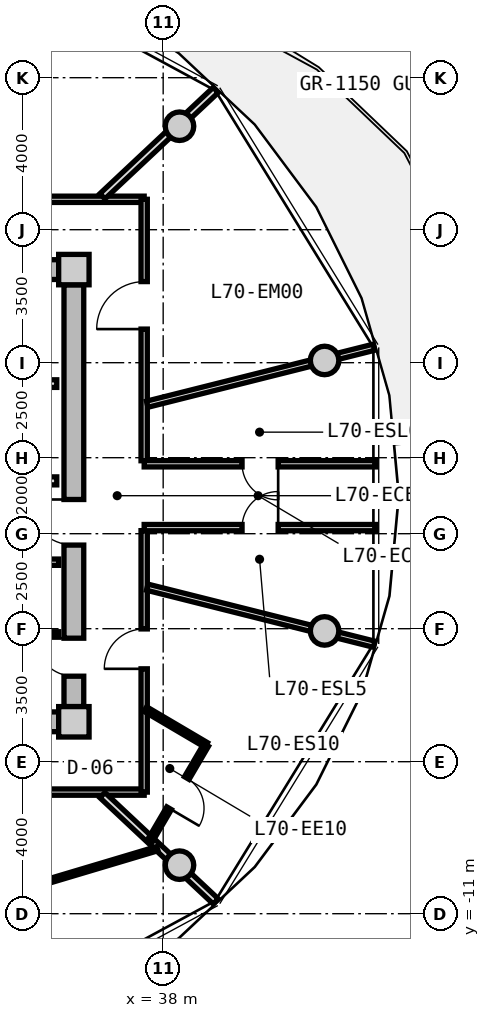
"""IFC4 building model, lengths in metres.
Left out: names, types, materials, properties, quantities, classifications, styles, units other than length and angle.
Written with IfcOpenShell. Run it as: python <this file> out.ifc"""

import sys

from ifc_helpers import new_model, si_unit, direction, frame, frame_2d, origin, origin_2d, place, context, subcontext, project, spatial, rectangle, circle, extrude, source, transform, mapped, element, fill, save


model = new_model("IFC4")
c1 = context("Model", 3, precision=1e-05, world=origin(), true_north=direction((0.0, 1.0)))
c2 = subcontext(c1, "Body", "Model", "MODEL_VIEW")
j1 = project(units=[si_unit("LENGTHUNIT", "METRE"), si_unit("PLANEANGLEUNIT", "RADIAN")], contexts=[c1])
p1 = place(None, origin())
s1 = spatial("IfcSite", under=j1, at=p1, CompositionType="ELEMENT")
p2 = place(p1, origin())
s2 = spatial("IfcBuilding", under=s1, at=p2, CompositionType="ELEMENT")
p3 = place(p2, frame((0.0, 0.0, 226.1)))
s3 = spatial("IfcBuildingStorey", under=s2, at=p3, CompositionType="ELEMENT", Elevation=226.1)
m1 = source(origin(), c2, "Body", "SweptSolid", [
    extrude(rectangle(XDim=0.8, YDim=0.8, at=origin_2d()), origin(), (0.0, 0.0, 1.0), 3.05),
])
for number, where, z_axis, x_axis in (
    (1, (35.65, -5.95, 0.0), (0.0, 0.0, 1.0), (1.0, 0.0, 0.0)),
    (2, (35.65, 5.95, 0.0), (0.0, 0.0, 1.0), (1.0, 0.0, 0.0)),
):
    element("IfcColumn", number, at=place(p3, frame(where, z_axis=z_axis, x_axis=x_axis)), inside=s3, PredefinedType="COLUMN", context=c2, shape_type="MappedRepresentation", body=[
        mapped(m1, transform((0.0, 0.0, 0.0), x_axis=(1.0, 0.0, 0.0), y_axis=(0.0, 1.0, 0.0), z_axis=(0.0, 0.0, 1.0), scale=1.0)),
    ])
m2 = source(origin(), c2, "Body", "SweptSolid", [
    extrude(rectangle(XDim=14.5, YDim=0.52, at=frame_2d((7.25, 0.0))), origin(), (0.0, 0.0, 1.0), 2.76),
])
for number, where, z_axis, x_axis in (
    (3, (20.75, 5.95, 0.0), (0.0, 0.0, 1.0), (1.0, 0.0, 0.0)),
    (4, (35.25, -5.95, 0.0), (0.0, 0.0, 1.0), (-1.0, 0.0, 0.0)),
):
    element("IfcWall", number, at=place(p3, frame(where, z_axis=z_axis, x_axis=x_axis)), inside=s3, PredefinedType="SHEAR", context=c2, shape_type="MappedRepresentation", body=[
        mapped(m2, transform((0.0, 0.0, 0.0), x_axis=(1.0, 0.0, 0.0), y_axis=(0.0, 1.0, 0.0), z_axis=(0.0, 0.0, 1.0), scale=1.0)),
    ])
m3 = source(origin(), c2, "Body", "SweptSolid", [
    extrude(rectangle(XDim=11.1, YDim=0.52, at=frame_2d((5.55, 0.0))), origin(), (0.0, 0.0, 1.0), 2.76),
])
p4 = place(p3, frame((35.65, 5.55, 0.0), z_axis=(0.0, 0.0, 1.0), x_axis=(0.0, -1.0, 0.0)))
e5 = element("IfcWall", 5, at=p4, inside=s3, PredefinedType="SHEAR", context=c2, shape_type="MappedRepresentation", body=[
    mapped(m3, transform((0.0, 0.0, 0.0), x_axis=(1.0, 0.0, 0.0), y_axis=(0.0, 1.0, 0.0), z_axis=(0.0, 0.0, 1.0), scale=1.0)),
])
p5 = place(p4, frame((5.65, 0.0, 0.0)))
e6 = element("IfcOpeningElement", 6, at=p5, cuts=e5, PredefinedType="OPENING", context=c2, shape_type="SweptSolid", body=[
    extrude(rectangle(XDim=1.2, YDim=2.15, at=frame_2d((0.6, 1.075))), frame((0.0, 0.27, 0.0), z_axis=(0.0, -1.0, 0.0), x_axis=(1.0, 0.0, 0.0)), (0.0, 0.0, 1.0), 0.54),
])
p6 = place(p4, frame((9.3, 0.0, 0.0)))
e7 = element("IfcOpeningElement", 7, at=p6, cuts=e5, PredefinedType="OPENING", context=c2, shape_type="SweptSolid", body=[
    extrude(rectangle(XDim=1.0, YDim=2.1, at=frame_2d((0.5, 1.05))), frame((0.0, 0.27, 0.0), z_axis=(0.0, -1.0, 0.0), x_axis=(1.0, 0.0, 0.0)), (0.0, 0.0, 1.0), 0.54),
])
m4 = source(origin(), c2, "Body", "SweptSolid", [
    extrude(circle(Radius=0.375, at=origin_2d()), origin(), (0.0, 0.0, 1.0), 3.05),
])
for number, where, z_axis, x_axis in (
    (8, (42.247, 3.559, 0.0), (0.0, 0.0, 1.0), (1.0, 0.0, 0.0)),
    (9, (38.43, 9.723, 0.0), (0.0, 0.0, 1.0), (1.0, 0.0, 0.0)),
    (10, (38.43, -9.723, 0.0), (0.0, 0.0, 1.0), (1.0, 0.0, 0.0)),
    (11, (42.247, -3.559, 0.0), (0.0, 0.0, 1.0), (1.0, 0.0, 0.0)),
):
    element("IfcColumn", number, at=place(p3, frame(where, z_axis=z_axis, x_axis=x_axis)), inside=s3, PredefinedType="COLUMN", context=c2, shape_type="MappedRepresentation", body=[
        mapped(m4, transform((0.0, 0.0, 0.0), x_axis=(1.0, 0.0, 0.0), y_axis=(0.0, 1.0, 0.0), z_axis=(0.0, 0.0, 1.0), scale=1.0)),
    ])
m5 = source(origin(), c2, "Body", "SweptSolid", [
    extrude(rectangle(XDim=3.2, YDim=0.2, at=frame_2d((1.6, 0.0))), origin(), (0.0, 0.0, 1.0), 2.745),
])
p7 = place(p3, frame((32.0, 2.95, 0.0), z_axis=(0.0, 0.0, 1.0), x_axis=(1.0, 0.0, 0.0)))
e12 = element("IfcWall", 12, at=p7, inside=s3, PredefinedType="PARTITIONING", context=c2, shape_type="MappedRepresentation", body=[
    mapped(m5, transform((0.0, 0.0, 0.0), x_axis=(1.0, 0.0, 0.0), y_axis=(0.0, 1.0, 0.0), z_axis=(0.0, 0.0, 1.0), scale=1.0)),
])
m6 = source(origin(), c2, "Body", "SweptSolid", [
    extrude(rectangle(XDim=6.66, YDim=0.21, at=frame_2d((3.33, 0.0))), origin(), (0.0, 0.0, 1.0), 2.745),
])
p8 = place(p3, frame((28.54, 0.39, 0.0), z_axis=(0.0, 0.0, 1.0), x_axis=(1.0, 0.0, 0.0)))
e13 = element("IfcWall", 13, at=p8, inside=s3, PredefinedType="PARTITIONING", context=c2, shape_type="MappedRepresentation", body=[
    mapped(m6, transform((0.0, 0.0, 0.0), x_axis=(1.0, 0.0, 0.0), y_axis=(0.0, 1.0, 0.0), z_axis=(0.0, 0.0, 1.0), scale=1.0)),
])
p9 = place(p8, frame((1.0, 0.0, 0.0)))
e14 = element("IfcOpeningElement", 14, at=p9, cuts=e13, PredefinedType="OPENING", context=c2, shape_type="SweptSolid", body=[
    extrude(rectangle(XDim=1.2, YDim=2.15, at=frame_2d((0.6, 1.075))), frame((0.0, 0.115, 0.0), z_axis=(0.0, -1.0, 0.0), x_axis=(1.0, 0.0, 0.0)), (0.0, 0.0, 1.0), 0.23),
])
m7 = source(origin(), c2, "Body", "SweptSolid", [
    extrude(rectangle(XDim=2.7, YDim=0.165, at=frame_2d((1.35, 0.0))), origin(), (0.0, 0.0, 1.0), 2.745),
])
p10 = place(p3, frame((32.55, -1.75, 0.0), z_axis=(0.0, 0.0, 1.0), x_axis=(1.0, 0.0, 0.0)))
e15 = element("IfcWall", 15, at=p10, inside=s3, PredefinedType="PARTITIONING", context=c2, shape_type="MappedRepresentation", body=[
    mapped(m7, transform((0.0, 0.0, 0.0), x_axis=(1.0, 0.0, 0.0), y_axis=(0.0, 1.0, 0.0), z_axis=(0.0, 0.0, 1.0), scale=1.0)),
])
p11 = place(p10, frame((0.85, 0.0, 0.0)))
e16 = element("IfcOpeningElement", 16, at=p11, cuts=e15, PredefinedType="OPENING", context=c2, shape_type="SweptSolid", body=[
    extrude(rectangle(XDim=0.925, YDim=2.1, at=frame_2d((0.462, 1.05))), frame((0.0, 0.093, 0.0), z_axis=(0.0, -1.0, 0.0), x_axis=(1.0, 0.0, 0.0)), (0.0, 0.0, 1.0), 0.185),
])
m8 = source(origin(), c2, "Body", "SweptSolid", [
    extrude(rectangle(XDim=2.7, YDim=0.14, at=frame_2d((1.35, 0.0))), origin(), (0.0, 0.0, 1.0), 2.745),
])
p12 = place(p3, frame((32.55, -3.65, 0.0), z_axis=(0.0, 0.0, 1.0), x_axis=(1.0, 0.0, 0.0)))
e17 = element("IfcWall", 17, at=p12, inside=s3, PredefinedType="PARTITIONING", context=c2, shape_type="MappedRepresentation", body=[
    mapped(m8, transform((0.0, 0.0, 0.0), x_axis=(1.0, 0.0, 0.0), y_axis=(0.0, 1.0, 0.0), z_axis=(0.0, 0.0, 1.0), scale=1.0)),
])
m9 = source(origin(), c2, "Body", "SweptSolid", [
    extrude(rectangle(XDim=8.58, YDim=0.165, at=frame_2d((4.29, 0.0))), origin(), (0.0, 0.0, 1.0), 2.745),
])
p13 = place(p3, frame((28.92, 7.8, 0.0), z_axis=(0.0, 0.0, 1.0), x_axis=(1.0, 0.0, 0.0)))
e18 = element("IfcWall", 18, at=p13, inside=s3, PredefinedType="PARTITIONING", context=c2, shape_type="MappedRepresentation", body=[
    mapped(m9, transform((0.0, 0.0, 0.0), x_axis=(1.0, 0.0, 0.0), y_axis=(0.0, 1.0, 0.0), z_axis=(0.0, 0.0, 1.0), scale=1.0)),
])
p14 = place(p13, frame((3.802, 0.0, 0.0)))
e19 = element("IfcOpeningElement", 19, at=p14, cuts=e18, PredefinedType="OPENING", context=c2, shape_type="SweptSolid", body=[
    extrude(rectangle(XDim=1.25, YDim=2.2, at=frame_2d((0.625, 1.1))), frame((0.0, 0.093, 0.0), z_axis=(0.0, -1.0, 0.0), x_axis=(1.0, 0.0, 0.0)), (0.0, 0.0, 1.0), 0.185),
])
m10 = source(origin(), c2, "Body", "SweptSolid", [
    extrude(rectangle(XDim=19.0, YDim=0.165, at=frame_2d((9.5, 0.0))), origin(), (0.0, 0.0, 1.0), 2.745),
])
p15 = place(p3, frame((37.5, -7.8, 0.0), z_axis=(0.0, 0.0, 1.0), x_axis=(-1.0, 0.0, 0.0)))
e20 = element("IfcWall", 20, at=p15, inside=s3, PredefinedType="PARTITIONING", context=c2, shape_type="MappedRepresentation", body=[
    mapped(m10, transform((0.0, 0.0, 0.0), x_axis=(1.0, 0.0, 0.0), y_axis=(0.0, 1.0, 0.0), z_axis=(0.0, 0.0, 1.0), scale=1.0)),
])
p16 = place(p15, frame((9.392, 0.0, 0.0)))
e21 = element("IfcOpeningElement", 21, at=p16, cuts=e20, PredefinedType="OPENING", context=c2, shape_type="SweptSolid", body=[
    extrude(rectangle(XDim=1.05, YDim=2.15, at=frame_2d((0.525, 1.075))), frame((0.0, 0.093, 0.0), z_axis=(0.0, -1.0, 0.0), x_axis=(1.0, 0.0, 0.0)), (0.0, 0.0, 1.0), 0.185),
])
m11 = source(origin(), c2, "Body", "SweptSolid", [
    extrude(rectangle(XDim=6.88, YDim=0.165, at=frame_2d((3.44, 0.0))), origin(), (0.0, 0.0, 1.0), 2.745),
])
p17 = place(p3, frame((37.5, 7.8, 0.0), z_axis=(0.0, 0.0, 1.0), x_axis=(0.0, -1.0, 0.0)))
e22 = element("IfcWall", 22, at=p17, inside=s3, PredefinedType="PARTITIONING", context=c2, shape_type="MappedRepresentation", body=[
    mapped(m11, transform((0.0, 0.0, 0.0), x_axis=(1.0, 0.0, 0.0), y_axis=(0.0, 1.0, 0.0), z_axis=(0.0, 0.0, 1.0), scale=1.0)),
])
p18 = place(p17, frame((2.166, 0.0, 0.0)))
e23 = element("IfcOpeningElement", 23, at=p18, cuts=e22, PredefinedType="OPENING", context=c2, shape_type="SweptSolid", body=[
    extrude(rectangle(XDim=1.25, YDim=2.2, at=frame_2d((0.625, 1.1))), frame((0.0, 0.093, 0.0), z_axis=(0.0, -1.0, 0.0), x_axis=(1.0, 0.0, 0.0)), (0.0, 0.0, 1.0), 0.185),
])
p19 = place(p3, frame((37.5, -0.92, 0.0), z_axis=(0.0, 0.0, 1.0), x_axis=(0.0, -1.0, 0.0)))
e24 = element("IfcWall", 24, at=p19, inside=s3, PredefinedType="PARTITIONING", context=c2, shape_type="MappedRepresentation", body=[
    mapped(m11, transform((0.0, 0.0, 0.0), x_axis=(1.0, 0.0, 0.0), y_axis=(0.0, 1.0, 0.0), z_axis=(0.0, 0.0, 1.0), scale=1.0)),
])
p20 = place(p19, frame((2.586, 0.0, 0.0)))
e25 = element("IfcOpeningElement", 25, at=p20, cuts=e24, PredefinedType="OPENING", context=c2, shape_type="SweptSolid", body=[
    extrude(rectangle(XDim=1.05, YDim=2.15, at=frame_2d((0.525, 1.075))), frame((0.0, 0.093, 0.0), z_axis=(0.0, -1.0, 0.0), x_axis=(1.0, 0.0, 0.0)), (0.0, 0.0, 1.0), 0.185),
])
m12 = source(origin(), c2, "Body", "SweptSolid", [
    extrude(rectangle(XDim=6.157, YDim=0.165, at=frame_2d((3.079, 0.0))), origin(), (0.0, 0.0, 1.0), 2.345),
])
for number, where, z_axis, x_axis in (
    (26, (37.58, -2.407, 0.0), (0.0, 0.0, 1.0), (0.97, -0.244, 0.0)),
    (27, (37.58, 2.407, 0.0), (0.0, 0.0, 1.0), (0.97, 0.244, 0.0)),
):
    element("IfcWall", number, at=place(p3, frame(where, z_axis=z_axis, x_axis=x_axis)), inside=s3, PredefinedType="PARTITIONING", context=c2, shape_type="MappedRepresentation", body=[
        mapped(m12, transform((0.0, 0.0, 0.0), x_axis=(1.0, 0.0, 0.0), y_axis=(0.0, 1.0, 0.0), z_axis=(0.0, 0.0, 1.0), scale=1.0)),
    ])
m13 = source(origin(), c2, "Body", "SweptSolid", [
    extrude(rectangle(XDim=6.101, YDim=0.165, at=frame_2d((3.051, 0.0))), origin(), (0.0, 0.0, 1.0), 2.745),
])
p21 = place(p3, frame((37.5, 0.84, 0.0), z_axis=(0.0, 0.0, 1.0), x_axis=(1.0, 0.0, 0.0)))
e28 = element("IfcWall", 28, at=p21, inside=s3, PredefinedType="PARTITIONING", context=c2, shape_type="MappedRepresentation", body=[
    mapped(m13, transform((0.0, 0.0, 0.0), x_axis=(1.0, 0.0, 0.0), y_axis=(0.0, 1.0, 0.0), z_axis=(0.0, 0.0, 1.0), scale=1.0)),
])
p22 = place(p21, frame((2.576, 0.0, 0.0)))
e29 = element("IfcOpeningElement", 29, at=p22, cuts=e28, PredefinedType="OPENING", context=c2, shape_type="SweptSolid", body=[
    extrude(rectangle(XDim=0.95, YDim=2.1, at=frame_2d((0.475, 1.05))), frame((0.0, 0.093, 0.0), z_axis=(0.0, -1.0, 0.0), x_axis=(1.0, 0.0, 0.0)), (0.0, 0.0, 1.0), 0.185),
])
p23 = place(p3, frame((43.601, -0.84, 0.0), z_axis=(0.0, 0.0, 1.0), x_axis=(-1.0, 0.0, 0.0)))
e30 = element("IfcWall", 30, at=p23, inside=s3, PredefinedType="PARTITIONING", context=c2, shape_type="MappedRepresentation", body=[
    mapped(m13, transform((0.0, 0.0, 0.0), x_axis=(1.0, 0.0, 0.0), y_axis=(0.0, 1.0, 0.0), z_axis=(0.0, 0.0, 1.0), scale=1.0)),
])
p24 = place(p23, frame((2.576, 0.0, 0.0)))
e31 = element("IfcOpeningElement", 31, at=p24, cuts=e30, PredefinedType="OPENING", context=c2, shape_type="SweptSolid", body=[
    extrude(rectangle(XDim=0.95, YDim=2.1, at=frame_2d((0.475, 1.05))), frame((0.0, 0.093, 0.0), z_axis=(0.0, -1.0, 0.0), x_axis=(1.0, 0.0, 0.0)), (0.0, 0.0, 1.0), 0.185),
])
m14 = source(origin(), c2, "Body", "SweptSolid", [
    extrude(rectangle(XDim=4.089, YDim=0.19, at=frame_2d((2.044, 0.0))), origin(), (0.0, 0.0, 1.0), 2.345),
])
for number, where, z_axis, x_axis in (
    (32, (36.402, 7.88, 0.0), (0.0, 0.0, 1.0), (0.729, 0.684, 0.0)),
    (33, (36.402, -7.88, 0.0), (0.0, 0.0, 1.0), (0.729, -0.684, 0.0)),
):
    element("IfcWall", number, at=place(p3, frame(where, z_axis=z_axis, x_axis=x_axis)), inside=s3, PredefinedType="PARTITIONING", context=c2, shape_type="MappedRepresentation", body=[
        mapped(m14, transform((0.0, 0.0, 0.0), x_axis=(1.0, 0.0, 0.0), y_axis=(0.0, 1.0, 0.0), z_axis=(0.0, 0.0, 1.0), scale=1.0)),
    ])
m15 = source(origin(), c2, "Body", "SweptSolid", [
    extrude(rectangle(XDim=6.936, YDim=0.115, at=frame_2d((3.468, 0.0))), origin(), (0.0, 0.0, 1.0), 2.745),
])
p25 = place(p3, frame((31.203, -11.272, 0.0), z_axis=(0.0, 0.0, 1.0), x_axis=(0.958186895835, 0.286143098205, 0.0)))
e34 = element("IfcWall", 34, at=p25, inside=s3, PredefinedType="PARTITIONING", context=c2, shape_type="MappedRepresentation", body=[
    mapped(m15, transform((0.0, 0.0, 0.0), x_axis=(1.0, 0.0, 0.0), y_axis=(0.0, 1.0, 0.0), z_axis=(0.0, 0.0, 1.0), scale=1.0)),
])
p26 = place(p25, frame((2.993, 0.0, 0.0)))
e35 = element("IfcOpeningElement", 35, at=p26, cuts=e34, PredefinedType="OPENING", context=c2, shape_type="SweptSolid", body=[
    extrude(rectangle(XDim=0.95, YDim=2.1, at=frame_2d((0.475, 1.05))), frame((0.0, 0.067, 0.0), z_axis=(0.0, -1.0, 0.0), x_axis=(1.0, 0.0, 0.0)), (0.0, 0.0, 1.0), 0.135),
])
m16 = source(origin(), c2, "Body", "SweptSolid", [
    extrude(rectangle(XDim=1.859, YDim=0.14, at=frame_2d((0.93, 0.0))), origin(), (0.0, 0.0, 1.0), 2.745),
])
p27 = place(p3, frame((37.53, -5.615, 0.0), z_axis=(0.0, 0.0, 1.0), x_axis=(0.861555897139, -0.507662718845, 0.0)))
e36 = element("IfcWall", 36, at=p27, inside=s3, PredefinedType="PARTITIONING", context=c2, shape_type="MappedRepresentation", body=[
    mapped(m16, transform((0.0, 0.0, 0.0), x_axis=(1.0, 0.0, 0.0), y_axis=(0.0, 1.0, 0.0), z_axis=(0.0, 0.0, 1.0), scale=1.0)),
])
m17 = source(origin(), c2, "Body", "SweptSolid", [
    extrude(rectangle(XDim=2.939, YDim=0.14, at=frame_2d((1.47, 0.0))), origin(), (0.0, 0.0, 1.0), 2.745),
])
p28 = place(p3, frame((39.132, -6.559, 0.0), z_axis=(0.0, 0.0, 1.0), x_axis=(-0.505883614636, -0.862601743821, 0.0)))
e37 = element("IfcWall", 37, at=p28, inside=s3, PredefinedType="PARTITIONING", context=c2, shape_type="MappedRepresentation", body=[
    mapped(m17, transform((0.0, 0.0, 0.0), x_axis=(1.0, 0.0, 0.0), y_axis=(0.0, 1.0, 0.0), z_axis=(0.0, 0.0, 1.0), scale=1.0)),
])
p29 = place(p28, frame((1.01, 0.0, 0.0)))
e38 = element("IfcOpeningElement", 38, at=p29, cuts=e37, PredefinedType="OPENING", context=c2, shape_type="SweptSolid", body=[
    extrude(rectangle(XDim=0.92, YDim=2.1, at=frame_2d((0.46, 1.05))), frame((0.0, 0.08, 0.0), z_axis=(0.0, -1.0, 0.0), x_axis=(1.0, 0.0, 0.0)), (0.0, 0.0, 1.0), 0.16),
])
m18 = source(origin(), c2, "Body", "SweptSolid", [
    extrude(rectangle(XDim=1.2, YDim=2.15, at=frame_2d((0.6, 1.075))), frame((0.0, 0.025, 0.0), z_axis=(0.0, -1.0, 0.0), x_axis=(1.0, 0.0, 0.0)), (0.0, 0.0, 1.0), 0.05),
])
p30 = place(p5, frame((1.2, 0.0, 0.0), z_axis=(0.0, 0.0, 1.0), x_axis=(-1.0, 0.0, 0.0)))
e39 = element("IfcDoor", 39, at=p30, inside=s3, OperationType="SINGLE_SWING_RIGHT", PredefinedType="DOOR", context=c2, shape_type="MappedRepresentation", body=[
    mapped(m18, transform((0.0, 0.0, 0.0), x_axis=(1.0, 0.0, 0.0), y_axis=(0.0, 1.0, 0.0), z_axis=(0.0, 0.0, 1.0), scale=1.0)),
])
fill(e6, e39)
m19 = source(origin(), c2, "Body", "SweptSolid", [
    extrude(rectangle(XDim=1.0, YDim=2.1, at=frame_2d((0.5, 1.05))), frame((0.0, 0.025, 0.0), z_axis=(0.0, -1.0, 0.0), x_axis=(1.0, 0.0, 0.0)), (0.0, 0.0, 1.0), 0.05),
])
p31 = place(p6, frame((1.0, 0.0, 0.0), z_axis=(0.0, 0.0, 1.0), x_axis=(-1.0, 0.0, 0.0)))
e40 = element("IfcDoor", 40, at=p31, inside=s3, OperationType="SINGLE_SWING_RIGHT", PredefinedType="DOOR", context=c2, shape_type="MappedRepresentation", body=[
    mapped(m19, transform((0.0, 0.0, 0.0), x_axis=(1.0, 0.0, 0.0), y_axis=(0.0, 1.0, 0.0), z_axis=(0.0, 0.0, 1.0), scale=1.0)),
])
fill(e7, e40)
m20 = source(origin(), c2, "Body", "SweptSolid", [
    extrude(rectangle(XDim=0.95, YDim=2.1, at=frame_2d((0.475, 1.05))), frame((0.0, 0.025, 0.0), z_axis=(0.0, -1.0, 0.0), x_axis=(1.0, 0.0, 0.0)), (0.0, 0.0, 1.0), 0.05),
])
p32 = place(p24, frame((0.95, 0.0, 0.0), z_axis=(0.0, 0.0, 1.0), x_axis=(-1.0, 0.0, 0.0)))
e41 = element("IfcDoor", 41, at=p32, inside=s3, OperationType="SINGLE_SWING_RIGHT", PredefinedType="DOOR", context=c2, shape_type="MappedRepresentation", body=[
    mapped(m20, transform((0.0, 0.0, 0.0), x_axis=(1.0, 0.0, 0.0), y_axis=(0.0, 1.0, 0.0), z_axis=(0.0, 0.0, 1.0), scale=1.0)),
])
fill(e31, e41)
p33 = place(p22, frame((0.95, 0.0, 0.0), z_axis=(0.0, 0.0, 1.0), x_axis=(-1.0, 0.0, 0.0)))
e42 = element("IfcDoor", 42, at=p33, inside=s3, OperationType="SINGLE_SWING_LEFT", PredefinedType="DOOR", context=c2, shape_type="MappedRepresentation", body=[
    mapped(m20, transform((0.0, 0.0, 0.0), x_axis=(1.0, 0.0, 0.0), y_axis=(0.0, 1.0, 0.0), z_axis=(0.0, 0.0, 1.0), scale=1.0)),
])
fill(e29, e42)
m21 = source(origin(), c2, "Body", "SweptSolid", [
    extrude(rectangle(XDim=1.25, YDim=2.2, at=frame_2d((0.625, 1.1))), frame((0.0, 0.025, 0.0), z_axis=(0.0, -1.0, 0.0), x_axis=(1.0, 0.0, 0.0)), (0.0, 0.0, 1.0), 0.05),
])
p34 = place(p18, frame((1.25, 0.0, 0.0), z_axis=(0.0, 0.0, 1.0), x_axis=(-1.0, 0.0, 0.0)))
e43 = element("IfcDoor", 43, at=p34, inside=s3, OperationType="SINGLE_SWING_LEFT", PredefinedType="DOOR", context=c2, shape_type="MappedRepresentation", body=[
    mapped(m21, transform((0.0, 0.0, 0.0), x_axis=(1.0, 0.0, 0.0), y_axis=(0.0, 1.0, 0.0), z_axis=(0.0, 0.0, 1.0), scale=1.0)),
])
fill(e23, e43)
m22 = source(origin(), c2, "Body", "SweptSolid", [
    extrude(rectangle(XDim=1.05, YDim=2.15, at=frame_2d((0.525, 1.075))), frame((0.0, 0.025, 0.0), z_axis=(0.0, -1.0, 0.0), x_axis=(1.0, 0.0, 0.0)), (0.0, 0.0, 1.0), 0.05),
])
p35 = place(p20, frame((1.05, 0.0, 0.0), z_axis=(0.0, 0.0, 1.0), x_axis=(-1.0, 0.0, 0.0)))
e44 = element("IfcDoor", 44, at=p35, inside=s3, OperationType="SINGLE_SWING_LEFT", PredefinedType="DOOR", context=c2, shape_type="MappedRepresentation", body=[
    mapped(m22, transform((0.0, 0.0, 0.0), x_axis=(1.0, 0.0, 0.0), y_axis=(0.0, 1.0, 0.0), z_axis=(0.0, 0.0, 1.0), scale=1.0)),
])
fill(e25, e44)
m23 = source(origin(), c2, "Body", "SweptSolid", [
    extrude(rectangle(XDim=0.92, YDim=2.1, at=frame_2d((0.46, 1.05))), frame((0.0, 0.025, 0.0), z_axis=(0.0, -1.0, 0.0), x_axis=(1.0, 0.0, 0.0)), (0.0, 0.0, 1.0), 0.05),
])
p36 = place(p29, origin())
e45 = element("IfcDoor", 45, at=p36, inside=s3, OperationType="SINGLE_SWING_RIGHT", PredefinedType="DOOR", context=c2, shape_type="MappedRepresentation", body=[
    mapped(m23, transform((0.0, 0.0, 0.0), x_axis=(1.0, 0.0, 0.0), y_axis=(0.0, 1.0, 0.0), z_axis=(0.0, 0.0, 1.0), scale=1.0)),
])
fill(e38, e45)
save(model, sys.argv[1])
